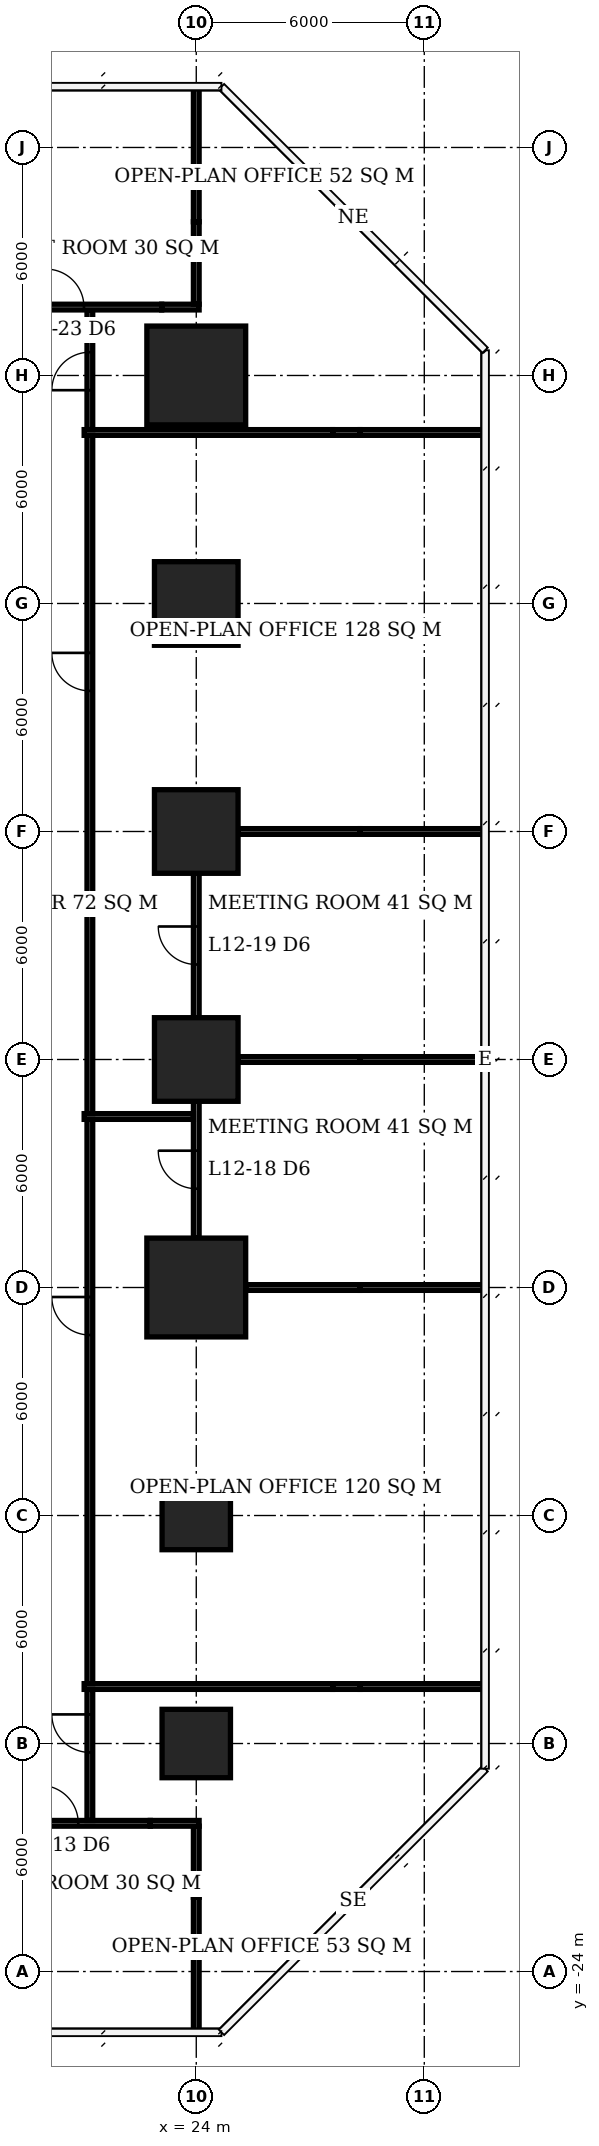
"""IFC4 building model, lengths in metres.
Left out: names, types, materials, properties, quantities, classifications, styles, units other than length and angle.
Written with IfcOpenShell. Run it as: python <this file> out.ifc"""

import sys

from ifc_helpers import new_model, si_unit, direction, frame, frame_2d, origin, origin_2d, place, context, subcontext, project, spatial, rectangle, extrude, element, fill, save


model = new_model("IFC4")
c1 = context("Model", 3, precision=1e-05, world=origin(), true_north=direction((0.0, 1.0)))
c2 = subcontext(c1, "Body", "Model", "MODEL_VIEW")
j1 = project(units=[si_unit("LENGTHUNIT", "METRE"), si_unit("PLANEANGLEUNIT", "RADIAN")], contexts=[c1])
p1 = place(None, origin())
s1 = spatial("IfcSite", under=j1, at=p1, CompositionType="ELEMENT")
p2 = place(p1, origin())
s2 = spatial("IfcBuilding", under=s1, at=p2, CompositionType="ELEMENT")
p3 = place(p2, frame((0.0, 0.0, 53.3)))
s3 = spatial("IfcBuildingStorey", under=s2, at=p3, CompositionType="ELEMENT", Elevation=53.3)
for number, where, z_axis, x_axis in (
    (1, (24.0, -18.0, 0.0), (0.0, 0.0, 1.0), (1.0, 0.0, 0.0)),
    (2, (24.0, -12.0, 0.0), (0.0, 0.0, 1.0), (1.0, 0.0, 0.0)),
):
    element("IfcColumn", number, at=place(p3, frame(where, z_axis=z_axis, x_axis=x_axis)), inside=s3, PredefinedType="COLUMN", context=c2, shape_type="SweptSolid", body=[
        extrude(rectangle(XDim=1.8, YDim=1.8, at=origin_2d()), origin(), (0.0, 0.0, 1.0), 3.9),
    ])
p4 = place(p3, frame((24.0, -6.0, 0.0), z_axis=(0.0, 0.0, 1.0), x_axis=(1.0, 0.0, 0.0)))
e3 = element("IfcColumn", 3, at=p4, inside=s3, PredefinedType="COLUMN", context=c2, shape_type="SweptSolid", body=[
    extrude(rectangle(XDim=2.6, YDim=2.6, at=origin_2d()), origin(), (0.0, 0.0, 1.0), 3.9),
])
for number, where, z_axis, x_axis in (
    (4, (24.0, 0.0, 0.0), (0.0, 0.0, 1.0), (1.0, 0.0, 0.0)),
    (5, (24.0, 6.0, 0.0), (0.0, 0.0, 1.0), (1.0, 0.0, 0.0)),
    (6, (24.0, 12.0, 0.0), (0.0, 0.0, 1.0), (1.0, 0.0, 0.0)),
):
    element("IfcColumn", number, at=place(p3, frame(where, z_axis=z_axis, x_axis=x_axis)), inside=s3, PredefinedType="COLUMN", context=c2, shape_type="SweptSolid", body=[
        extrude(rectangle(XDim=2.2, YDim=2.2, at=origin_2d()), origin(), (0.0, 0.0, 1.0), 3.9),
    ])
p5 = place(p3, frame((24.0, 18.0, 0.0), z_axis=(0.0, 0.0, 1.0), x_axis=(1.0, 0.0, 0.0)))
e7 = element("IfcColumn", 7, at=p5, inside=s3, PredefinedType="COLUMN", context=c2, shape_type="SweptSolid", body=[
    extrude(rectangle(XDim=2.6, YDim=2.6, at=origin_2d()), origin(), (0.0, 0.0, 1.0), 3.9),
])
p6 = place(p3, frame((18.075, -20.1, 0.0), z_axis=(0.0, 0.0, 1.0), x_axis=(1.0, 0.0, 0.0)))
e8 = element("IfcWall", 8, at=p6, inside=s3, PredefinedType="PARTITIONING", context=c2, shape_type="SweptSolid", body=[
    extrude(rectangle(XDim=4.715, YDim=0.15, at=frame_2d((2.357, 0.0))), origin(), (0.0, 0.0, 1.0), 3.65),
])
p7 = place(p6, frame((1.82, 0.0, 0.0)))
e9 = element("IfcOpeningElement", 9, at=p7, cuts=e8, PredefinedType="OPENING", context=c2, shape_type="SweptSolid", body=[
    extrude(rectangle(XDim=1.0, YDim=2.1, at=frame_2d((0.5, 1.05))), frame((0.0, 0.085, 0.0), z_axis=(0.0, -1.0, 0.0), x_axis=(1.0, 0.0, 0.0)), (0.0, 0.0, 1.0), 0.17),
])
p8 = place(p3, frame((22.79, -20.1, 0.0), z_axis=(0.0, 0.0, 1.0), x_axis=(1.0, 0.0, 0.0)))
e10 = element("IfcWall", 10, at=p8, inside=s3, PredefinedType="PARTITIONING", context=c2, shape_type="SweptSolid", body=[
    extrude(rectangle(XDim=1.285, YDim=0.15, at=frame_2d((0.643, 0.0))), origin(), (0.0, 0.0, 1.0), 2.65),
])
p9 = place(p3, frame((25.3, -6.0, 0.0), z_axis=(0.0, 0.0, 1.0), x_axis=(1.0, 0.0, 0.0)))
e11 = element("IfcWall", 11, at=p9, inside=s3, PredefinedType="PARTITIONING", context=c2, shape_type="SweptSolid", body=[
    extrude(rectangle(XDim=3.01, YDim=0.15, at=frame_2d((1.505, 0.0))), origin(), (0.0, 0.0, 1.0), 2.65),
])
p10 = place(p3, frame((28.31, -6.0, 0.0), z_axis=(0.0, 0.0, 1.0), x_axis=(1.0, 0.0, 0.0)))
e12 = element("IfcWall", 12, at=p10, inside=s3, PredefinedType="PARTITIONING", context=c2, shape_type="SweptSolid", body=[
    extrude(rectangle(XDim=3.29, YDim=0.15, at=frame_2d((1.645, 0.0))), origin(), (0.0, 0.0, 1.0), 3.65),
])
p11 = place(p3, frame((25.1, 0.0, 0.0), z_axis=(0.0, 0.0, 1.0), x_axis=(1.0, 0.0, 0.0)))
e13 = element("IfcWall", 13, at=p11, inside=s3, PredefinedType="PARTITIONING", context=c2, shape_type="SweptSolid", body=[
    extrude(rectangle(XDim=3.21, YDim=0.15, at=frame_2d((1.605, 0.0))), origin(), (0.0, 0.0, 1.0), 2.65),
])
p12 = place(p3, frame((28.31, 0.0, 0.0), z_axis=(0.0, 0.0, 1.0), x_axis=(1.0, 0.0, 0.0)))
e14 = element("IfcWall", 14, at=p12, inside=s3, PredefinedType="PARTITIONING", context=c2, shape_type="SweptSolid", body=[
    extrude(rectangle(XDim=3.24, YDim=0.15, at=frame_2d((1.62, 0.0))), origin(), (0.0, 0.0, 1.0), 3.65),
])
p13 = place(p3, frame((25.1, 6.0, 0.0), z_axis=(0.0, 0.0, 1.0), x_axis=(1.0, 0.0, 0.0)))
e15 = element("IfcWall", 15, at=p13, inside=s3, PredefinedType="PARTITIONING", context=c2, shape_type="SweptSolid", body=[
    extrude(rectangle(XDim=3.21, YDim=0.15, at=frame_2d((1.605, 0.0))), origin(), (0.0, 0.0, 1.0), 2.65),
])
p14 = place(p3, frame((28.31, 6.0, 0.0), z_axis=(0.0, 0.0, 1.0), x_axis=(1.0, 0.0, 0.0)))
e16 = element("IfcWall", 16, at=p14, inside=s3, PredefinedType="PARTITIONING", context=c2, shape_type="SweptSolid", body=[
    extrude(rectangle(XDim=3.29, YDim=0.15, at=frame_2d((1.645, 0.0))), origin(), (0.0, 0.0, 1.0), 3.65),
])
p15 = place(p3, frame((18.075, 19.8, 0.0), z_axis=(0.0, 0.0, 1.0), x_axis=(1.0, 0.0, 0.0)))
e17 = element("IfcWall", 17, at=p15, inside=s3, PredefinedType="PARTITIONING", context=c2, shape_type="SweptSolid", body=[
    extrude(rectangle(XDim=5.015, YDim=0.15, at=frame_2d((2.508, 0.0))), origin(), (0.0, 0.0, 1.0), 3.65),
])
p16 = place(p15, frame((1.97, 0.0, 0.0)))
e18 = element("IfcOpeningElement", 18, at=p16, cuts=e17, PredefinedType="OPENING", context=c2, shape_type="SweptSolid", body=[
    extrude(rectangle(XDim=1.0, YDim=2.1, at=frame_2d((0.5, 1.05))), frame((0.0, 0.085, 0.0), z_axis=(0.0, -1.0, 0.0), x_axis=(1.0, 0.0, 0.0)), (0.0, 0.0, 1.0), 0.17),
])
p17 = place(p3, frame((23.09, 19.8, 0.0), z_axis=(0.0, 0.0, 1.0), x_axis=(1.0, 0.0, 0.0)))
e19 = element("IfcWall", 19, at=p17, inside=s3, PredefinedType="PARTITIONING", context=c2, shape_type="SweptSolid", body=[
    extrude(rectangle(XDim=0.985, YDim=0.15, at=frame_2d((0.492, 0.0))), origin(), (0.0, 0.0, 1.0), 2.65),
])
p18 = place(p3, frame((24.0, -25.6, 0.0), z_axis=(0.0, 0.0, 1.0), x_axis=(0.0, 1.0, 0.0)))
e20 = element("IfcWall", 20, at=p18, inside=s3, PredefinedType="PARTITIONING", context=c2, shape_type="SweptSolid", body=[
    extrude(rectangle(XDim=3.555, YDim=0.15, at=frame_2d((1.778, 0.0))), origin(), (0.0, 0.0, 1.0), 3.65),
])
p19 = place(p3, frame((24.0, -22.045, 0.0), z_axis=(0.0, 0.0, 1.0), x_axis=(0.0, 1.0, 0.0)))
e21 = element("IfcWall", 21, at=p19, inside=s3, PredefinedType="PARTITIONING", context=c2, shape_type="SweptSolid", body=[
    extrude(rectangle(XDim=1.87, YDim=0.15, at=frame_2d((0.935, 0.0))), origin(), (0.0, 0.0, 1.0), 2.65),
])
p20 = place(p3, frame((24.0, -4.7, 0.0), z_axis=(0.0, 0.0, 1.0), x_axis=(0.0, 1.0, 0.0)))
e22 = element("IfcWall", 22, at=p20, inside=s3, PredefinedType="PARTITIONING", context=c2, shape_type="SweptSolid", body=[
    extrude(rectangle(XDim=3.6, YDim=0.15, at=frame_2d((1.8, 0.0))), origin(), (0.0, 0.0, 1.0), 3.65),
])
p21 = place(p20, frame((1.3, 0.0, 0.0)))
e23 = element("IfcOpeningElement", 23, at=p21, cuts=e22, PredefinedType="OPENING", context=c2, shape_type="SweptSolid", body=[
    extrude(rectangle(XDim=1.0, YDim=2.1, at=frame_2d((0.5, 1.05))), frame((0.0, 0.085, 0.0), z_axis=(0.0, -1.0, 0.0), x_axis=(1.0, 0.0, 0.0)), (0.0, 0.0, 1.0), 0.17),
])
p22 = place(p3, frame((24.0, 1.1, 0.0), z_axis=(0.0, 0.0, 1.0), x_axis=(0.0, 1.0, 0.0)))
e24 = element("IfcWall", 24, at=p22, inside=s3, PredefinedType="PARTITIONING", context=c2, shape_type="SweptSolid", body=[
    extrude(rectangle(XDim=3.8, YDim=0.15, at=frame_2d((1.9, 0.0))), origin(), (0.0, 0.0, 1.0), 3.65),
])
p23 = place(p22, frame((1.4, 0.0, 0.0)))
e25 = element("IfcOpeningElement", 25, at=p23, cuts=e24, PredefinedType="OPENING", context=c2, shape_type="SweptSolid", body=[
    extrude(rectangle(XDim=1.0, YDim=2.1, at=frame_2d((0.5, 1.05))), frame((0.0, 0.085, 0.0), z_axis=(0.0, -1.0, 0.0), x_axis=(1.0, 0.0, 0.0)), (0.0, 0.0, 1.0), 0.17),
])
p24 = place(p3, frame((24.0, 19.875, 0.0), z_axis=(0.0, 0.0, 1.0), x_axis=(0.0, 1.0, 0.0)))
e26 = element("IfcWall", 26, at=p24, inside=s3, PredefinedType="PARTITIONING", context=c2, shape_type="SweptSolid", body=[
    extrude(rectangle(XDim=2.17, YDim=0.15, at=frame_2d((1.085, 0.0))), origin(), (0.0, 0.0, 1.0), 2.65),
])
p25 = place(p3, frame((24.0, 22.045, 0.0), z_axis=(0.0, 0.0, 1.0), x_axis=(0.0, 1.0, 0.0)))
e27 = element("IfcWall", 27, at=p25, inside=s3, PredefinedType="PARTITIONING", context=c2, shape_type="SweptSolid", body=[
    extrude(rectangle(XDim=3.555, YDim=0.15, at=frame_2d((1.778, 0.0))), origin(), (0.0, 0.0, 1.0), 3.65),
])
p26 = place(p3, frame((21.2, -20.025, 0.0), z_axis=(0.0, 0.0, 1.0), x_axis=(0.0, 1.0, 0.0)))
e28 = element("IfcWall", 28, at=p26, inside=s3, PredefinedType="PARTITIONING", context=c2, shape_type="SweptSolid", body=[
    extrude(rectangle(XDim=3.45, YDim=0.15, at=frame_2d((1.725, 0.0))), origin(), (0.0, 0.0, 1.0), 3.65),
])
p27 = place(p26, frame((1.791, 0.0, 0.0)))
e29 = element("IfcOpeningElement", 29, at=p27, cuts=e28, PredefinedType="OPENING", context=c2, shape_type="SweptSolid", body=[
    extrude(rectangle(XDim=1.0, YDim=2.1, at=frame_2d((0.5, 1.05))), frame((0.0, 0.085, 0.0), z_axis=(0.0, -1.0, 0.0), x_axis=(1.0, 0.0, 0.0)), (0.0, 0.0, 1.0), 0.17),
])
p28 = place(p3, frame((21.2, -16.425, 0.0), z_axis=(0.0, 0.0, 1.0), x_axis=(0.0, 1.0, 0.0)))
e30 = element("IfcWall", 30, at=p28, inside=s3, PredefinedType="PARTITIONING", context=c2, shape_type="SweptSolid", body=[
    extrude(rectangle(XDim=14.85, YDim=0.15, at=frame_2d((7.425, 0.0))), origin(), (0.0, 0.0, 1.0), 3.65),
])
p29 = place(p28, frame((9.175, 0.0, 0.0)))
e31 = element("IfcOpeningElement", 31, at=p29, cuts=e30, PredefinedType="OPENING", context=c2, shape_type="SweptSolid", body=[
    extrude(rectangle(XDim=1.0, YDim=2.1, at=frame_2d((0.5, 1.05))), frame((0.0, 0.085, 0.0), z_axis=(0.0, -1.0, 0.0), x_axis=(1.0, 0.0, 0.0)), (0.0, 0.0, 1.0), 0.17),
])
p30 = place(p3, frame((21.05, -16.5, 0.0), z_axis=(0.0, 0.0, 1.0), x_axis=(1.0, 0.0, 0.0)))
e32 = element("IfcWall", 32, at=p30, inside=s3, PredefinedType="PARTITIONING", context=c2, shape_type="SweptSolid", body=[
    extrude(rectangle(XDim=6.54, YDim=0.15, at=frame_2d((3.27, 0.0))), origin(), (0.0, 0.0, 1.0), 3.65),
])
p31 = place(p3, frame((27.59, -16.5, 0.0), z_axis=(0.0, 0.0, 1.0), x_axis=(1.0, 0.0, 0.0)))
e33 = element("IfcWall", 33, at=p31, inside=s3, PredefinedType="PARTITIONING", context=c2, shape_type="SweptSolid", body=[
    extrude(rectangle(XDim=0.72, YDim=0.15, at=frame_2d((0.36, 0.0))), origin(), (0.0, 0.0, 1.0), 2.65),
])
p32 = place(p3, frame((28.31, -16.5, 0.0), z_axis=(0.0, 0.0, 1.0), x_axis=(1.0, 0.0, 0.0)))
e34 = element("IfcWall", 34, at=p32, inside=s3, PredefinedType="PARTITIONING", context=c2, shape_type="SweptSolid", body=[
    extrude(rectangle(XDim=3.29, YDim=0.15, at=frame_2d((1.645, 0.0))), origin(), (0.0, 0.0, 1.0), 3.65),
])
p33 = place(p3, frame((21.2, -1.425, 0.0), z_axis=(0.0, 0.0, 1.0), x_axis=(0.0, 1.0, 0.0)))
e35 = element("IfcWall", 35, at=p33, inside=s3, PredefinedType="PARTITIONING", context=c2, shape_type="SweptSolid", body=[
    extrude(rectangle(XDim=17.85, YDim=0.15, at=frame_2d((8.925, 0.0))), origin(), (0.0, 0.0, 1.0), 3.65),
])
p34 = place(p33, frame((11.125, 0.0, 0.0)))
e36 = element("IfcOpeningElement", 36, at=p34, cuts=e35, PredefinedType="OPENING", context=c2, shape_type="SweptSolid", body=[
    extrude(rectangle(XDim=1.0, YDim=2.1, at=frame_2d((0.5, 1.05))), frame((0.0, 0.085, 0.0), z_axis=(0.0, -1.0, 0.0), x_axis=(1.0, 0.0, 0.0)), (0.0, 0.0, 1.0), 0.17),
])
p35 = place(p3, frame((21.05, -1.5, 0.0), z_axis=(0.0, 0.0, 1.0), x_axis=(1.0, 0.0, 0.0)))
e37 = element("IfcWall", 37, at=p35, inside=s3, PredefinedType="PARTITIONING", context=c2, shape_type="SweptSolid", body=[
    extrude(rectangle(XDim=2.875, YDim=0.15, at=frame_2d((1.438, 0.0))), origin(), (0.0, 0.0, 1.0), 3.65),
])
p36 = place(p3, frame((21.2, 16.575, 0.0), z_axis=(0.0, 0.0, 1.0), x_axis=(0.0, 1.0, 0.0)))
e38 = element("IfcWall", 38, at=p36, inside=s3, PredefinedType="PARTITIONING", context=c2, shape_type="SweptSolid", body=[
    extrude(rectangle(XDim=3.15, YDim=0.15, at=frame_2d((1.575, 0.0))), origin(), (0.0, 0.0, 1.0), 3.65),
])
p37 = place(p36, frame((1.038, 0.0, 0.0)))
e39 = element("IfcOpeningElement", 39, at=p37, cuts=e38, PredefinedType="OPENING", context=c2, shape_type="SweptSolid", body=[
    extrude(rectangle(XDim=1.0, YDim=2.1, at=frame_2d((0.5, 1.05))), frame((0.0, 0.085, 0.0), z_axis=(0.0, -1.0, 0.0), x_axis=(1.0, 0.0, 0.0)), (0.0, 0.0, 1.0), 0.17),
])
p38 = place(p3, frame((21.05, 16.5, 0.0), z_axis=(0.0, 0.0, 1.0), x_axis=(1.0, 0.0, 0.0)))
e40 = element("IfcWall", 40, at=p38, inside=s3, PredefinedType="PARTITIONING", context=c2, shape_type="SweptSolid", body=[
    extrude(rectangle(XDim=6.54, YDim=0.15, at=frame_2d((3.27, 0.0))), origin(), (0.0, 0.0, 1.0), 3.65),
])
p39 = place(p3, frame((27.59, 16.5, 0.0), z_axis=(0.0, 0.0, 1.0), x_axis=(1.0, 0.0, 0.0)))
e41 = element("IfcWall", 41, at=p39, inside=s3, PredefinedType="PARTITIONING", context=c2, shape_type="SweptSolid", body=[
    extrude(rectangle(XDim=0.72, YDim=0.15, at=frame_2d((0.36, 0.0))), origin(), (0.0, 0.0, 1.0), 2.65),
])
p40 = place(p3, frame((28.31, 16.5, 0.0), z_axis=(0.0, 0.0, 1.0), x_axis=(1.0, 0.0, 0.0)))
e42 = element("IfcWall", 42, at=p40, inside=s3, PredefinedType="PARTITIONING", context=c2, shape_type="SweptSolid", body=[
    extrude(rectangle(XDim=3.29, YDim=0.15, at=frame_2d((1.645, 0.0))), origin(), (0.0, 0.0, 1.0), 3.65),
])
p41 = place(p7, origin())
e43 = element("IfcDoor", 43, at=p41, inside=s3, OperationType="SINGLE_SWING_LEFT", PredefinedType="DOOR", context=c2, shape_type="SweptSolid", body=[
    extrude(rectangle(XDim=1.0, YDim=2.1, at=frame_2d((0.5, 1.05))), frame((0.0, 0.025, 0.0), z_axis=(0.0, -1.0, 0.0), x_axis=(1.0, 0.0, 0.0)), (0.0, 0.0, 1.0), 0.05),
])
fill(e9, e43)
p42 = place(p21, origin())
e44 = element("IfcDoor", 44, at=p42, inside=s3, OperationType="SINGLE_SWING_RIGHT", PredefinedType="DOOR", context=c2, shape_type="SweptSolid", body=[
    extrude(rectangle(XDim=1.0, YDim=2.1, at=frame_2d((0.5, 1.05))), frame((0.0, 0.025, 0.0), z_axis=(0.0, -1.0, 0.0), x_axis=(1.0, 0.0, 0.0)), (0.0, 0.0, 1.0), 0.05),
])
fill(e23, e44)
p43 = place(p23, origin())
e45 = element("IfcDoor", 45, at=p43, inside=s3, OperationType="SINGLE_SWING_RIGHT", PredefinedType="DOOR", context=c2, shape_type="SweptSolid", body=[
    extrude(rectangle(XDim=1.0, YDim=2.1, at=frame_2d((0.5, 1.05))), frame((0.0, 0.025, 0.0), z_axis=(0.0, -1.0, 0.0), x_axis=(1.0, 0.0, 0.0)), (0.0, 0.0, 1.0), 0.05),
])
fill(e25, e45)
p44 = place(p16, origin())
e46 = element("IfcDoor", 46, at=p44, inside=s3, OperationType="SINGLE_SWING_LEFT", PredefinedType="DOOR", context=c2, shape_type="SweptSolid", body=[
    extrude(rectangle(XDim=1.0, YDim=2.1, at=frame_2d((0.5, 1.05))), frame((0.0, 0.025, 0.0), z_axis=(0.0, -1.0, 0.0), x_axis=(1.0, 0.0, 0.0)), (0.0, 0.0, 1.0), 0.05),
])
fill(e18, e46)
p45 = place(p27, origin())
e47 = element("IfcDoor", 47, at=p45, inside=s3, OperationType="SINGLE_SWING_RIGHT", PredefinedType="DOOR", context=c2, shape_type="SweptSolid", body=[
    extrude(rectangle(XDim=1.0, YDim=2.1, at=frame_2d((0.5, 1.05))), frame((0.0, 0.025, 0.0), z_axis=(0.0, -1.0, 0.0), x_axis=(1.0, 0.0, 0.0)), (0.0, 0.0, 1.0), 0.05),
])
fill(e29, e47)
p46 = place(p29, origin())
e48 = element("IfcDoor", 48, at=p46, inside=s3, OperationType="SINGLE_SWING_RIGHT", PredefinedType="DOOR", context=c2, shape_type="SweptSolid", body=[
    extrude(rectangle(XDim=1.0, YDim=2.1, at=frame_2d((0.5, 1.05))), frame((0.0, 0.025, 0.0), z_axis=(0.0, -1.0, 0.0), x_axis=(1.0, 0.0, 0.0)), (0.0, 0.0, 1.0), 0.05),
])
fill(e31, e48)
p47 = place(p34, origin())
e49 = element("IfcDoor", 49, at=p47, inside=s3, OperationType="SINGLE_SWING_RIGHT", PredefinedType="DOOR", context=c2, shape_type="SweptSolid", body=[
    extrude(rectangle(XDim=1.0, YDim=2.1, at=frame_2d((0.5, 1.05))), frame((0.0, 0.025, 0.0), z_axis=(0.0, -1.0, 0.0), x_axis=(1.0, 0.0, 0.0)), (0.0, 0.0, 1.0), 0.05),
])
fill(e36, e49)
p48 = place(p37, origin())
e50 = element("IfcDoor", 50, at=p48, inside=s3, OperationType="SINGLE_SWING_LEFT", PredefinedType="DOOR", context=c2, shape_type="SweptSolid", body=[
    extrude(rectangle(XDim=1.0, YDim=2.1, at=frame_2d((0.5, 1.05))), frame((0.0, 0.025, 0.0), z_axis=(0.0, -1.0, 0.0), x_axis=(1.0, 0.0, 0.0)), (0.0, 0.0, 1.0), 0.05),
])
fill(e39, e50)
save(model, sys.argv[1])
